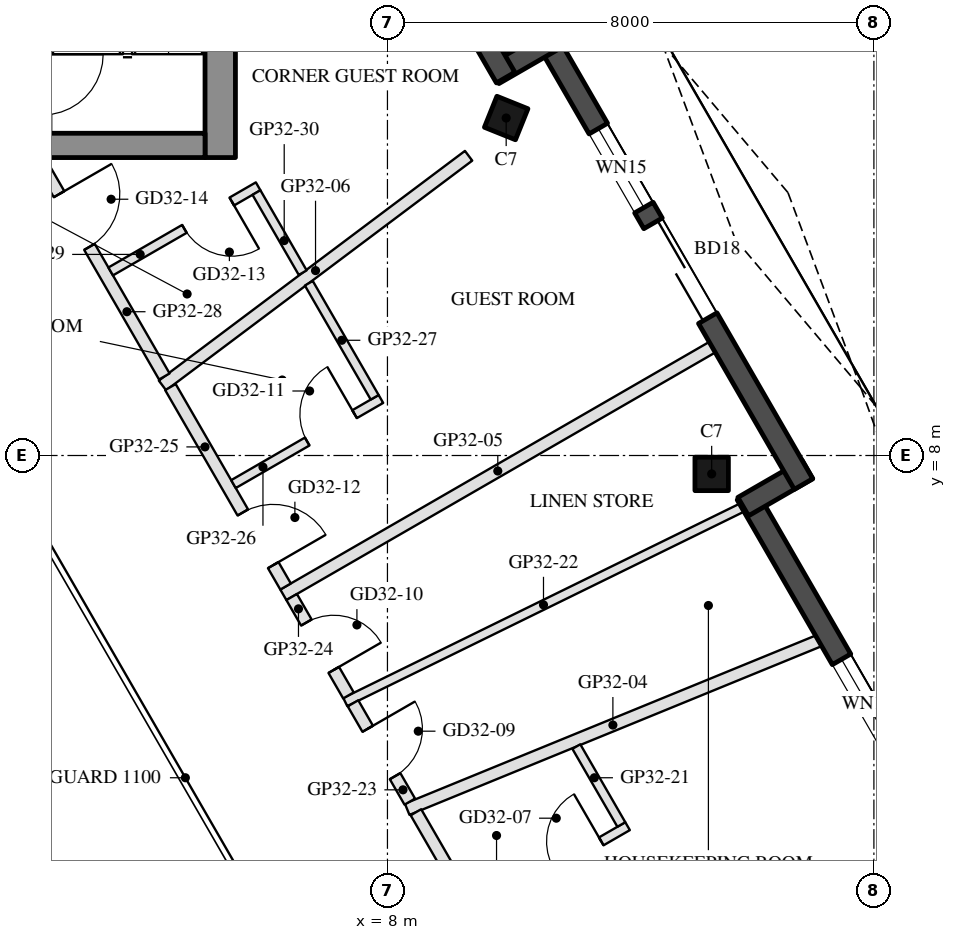
"""IFC4 building model, lengths in metres.
Left out: names, types, materials, properties, quantities, classifications, styles, units other than length and angle.
Written with IfcOpenShell. Run it as: python <this file> out.ifc"""

import sys

from ifc_helpers import new_model, si_unit, direction, frame, frame_2d, origin, origin_2d, place, context, subcontext, project, spatial, rectangle, hollow_rectangle, extrude, boolean, halfspace, element, fill, save


model = new_model("IFC4")
c1 = context("Model", 3, precision=1e-05, world=origin(), true_north=direction((0.0, 1.0)))
c2 = subcontext(c1, "Body", "Model", "MODEL_VIEW")
j1 = project(units=[si_unit("LENGTHUNIT", "METRE"), si_unit("PLANEANGLEUNIT", "RADIAN")], contexts=[c1])
p1 = place(None, origin())
s1 = spatial("IfcSite", under=j1, at=p1, CompositionType="ELEMENT")
p2 = place(p1, origin())
s2 = spatial("IfcBuilding", under=s1, at=p2, CompositionType="ELEMENT")
p3 = place(p2, frame((0.0, 0.0, 309.6)))
s3 = spatial("IfcBuildingStorey", under=s2, at=p3, CompositionType="ELEMENT", Elevation=309.6)
p4 = place(p3, frame((16.711, 1.844, 0.0), z_axis=(-0.161388519526, -0.022915997932, 0.986624854139), x_axis=(0.495109873729, -0.866696335889, 0.060857820306)))
e1 = element("IfcColumn", 1, at=p4, inside=s3, PredefinedType="COLUMN", context=c2, shape_type="SweptSolid", body=[
    boolean("DIFFERENCE", boolean("DIFFERENCE", extrude(hollow_rectangle(XDim=0.55, YDim=0.55, WallThickness=0.025, at=origin_2d()), origin(), (0.0, 0.0, 1.0), 3.75), halfspace(frame((0.0, 0.0, 0.034), z_axis=(0.0, 0.0, 1.0), x_axis=(1.0, 0.0, 0.0)), True)), halfspace(frame((0.0, 0.0, 3.716), z_axis=(0.0, 0.0, 1.0), x_axis=(1.0, 0.0, 0.0)), False)),
])
p5 = place(p3, frame((13.332, 7.697, 0.0), z_axis=(-0.131164739211, -0.075724645561, 0.988464257949), x_axis=(-0.499893753664, 0.866086736301, 1.5860259e-05)))
e2 = element("IfcColumn", 2, at=p5, inside=s3, PredefinedType="COLUMN", context=c2, shape_type="SweptSolid", body=[
    boolean("DIFFERENCE", boolean("DIFFERENCE", extrude(hollow_rectangle(XDim=0.55, YDim=0.55, WallThickness=0.025, at=origin_2d()), origin(), (0.0, 0.0, 1.0), 3.743), halfspace(frame((0.0, 0.0, 0.031), z_axis=(0.0, 0.0, 1.0), x_axis=(1.0, 0.0, 0.0)), True)), halfspace(frame((0.0, 0.0, 3.711), z_axis=(0.0, 0.0, 1.0), x_axis=(1.0, 0.0, 0.0)), False)),
])
p6 = place(p3, frame((9.953, 13.551, 0.0), z_axis=(-0.100518860507, -0.128252691192, 0.98663428173), x_axis=(-0.503004973265, 0.862140661686, 0.060823320673)))
e3 = element("IfcColumn", 3, at=p6, inside=s3, PredefinedType="COLUMN", context=c2, shape_type="SweptSolid", body=[
    boolean("DIFFERENCE", boolean("DIFFERENCE", extrude(hollow_rectangle(XDim=0.55, YDim=0.55, WallThickness=0.025, at=origin_2d()), origin(), (0.0, 0.0, 1.0), 3.75), halfspace(frame((0.0, 0.0, 0.034), z_axis=(0.0, 0.0, 1.0), x_axis=(1.0, 0.0, 0.0)), True)), halfspace(frame((0.0, 0.0, 3.716), z_axis=(0.0, 0.0, 1.0), x_axis=(1.0, 0.0, 0.0)), False)),
])
p7 = place(p3, frame((16.703, 2.509, 0.0), z_axis=(0.0, 0.0, 1.0), x_axis=(-0.499975351079, 0.866039634378, 0.0)))
e4 = element("IfcWall", 4, at=p7, inside=s3, PredefinedType="SOLIDWALL", context=c2, shape_type="SweptSolid", body=[
    extrude(rectangle(XDim=5.599, YDim=0.35, at=frame_2d((2.799, 0.0))), origin(), (0.0, 0.0, 1.0), 3.55),
])
p8 = place(p7, frame((0.77, 0.0, 0.3)))
e5 = element("IfcOpeningElement", 5, at=p8, cuts=e4, PredefinedType="OPENING", context=c2, shape_type="SweptSolid", body=[
    extrude(rectangle(XDim=1.7, YDim=2.65, at=frame_2d((0.85, 1.325))), frame((0.0, 0.185, 0.0), z_axis=(0.0, -1.0, 0.0), x_axis=(1.0, 0.0, 0.0)), (0.0, 0.0, 1.0), 0.37),
])
p9 = place(p3, frame((13.85, 7.159, 0.0), z_axis=(0.0, 0.0, 1.0), x_axis=(0.866005645448, 0.500034220881, 0.0)))
e6 = element("IfcWall", 6, at=p9, inside=s3, PredefinedType="SOLIDWALL", context=c2, shape_type="SweptSolid", body=[
    extrude(rectangle(XDim=1.22, YDim=0.35, at=frame_2d((0.61, 0.0))), origin(), (0.0, 0.0, 1.0), 3.55),
])
p10 = place(p3, frame((14.843, 7.531, 0.0), z_axis=(0.0, 0.0, 1.0), x_axis=(-0.500013816581, 0.866017426631, 0.0)))
e7 = element("IfcWall", 7, at=p10, inside=s3, PredefinedType="SOLIDWALL", context=c2, shape_type="SweptSolid", body=[
    extrude(rectangle(XDim=8.559, YDim=0.35, at=frame_2d((4.279, 0.0))), origin(), (0.0, 0.0, 1.0), 3.55),
])
p11 = place(p10, frame((3.15, 0.0, 0.0)))
e8 = element("IfcOpeningElement", 8, at=p11, cuts=e7, PredefinedType="OPENING", context=c2, shape_type="SweptSolid", body=[
    extrude(rectangle(XDim=1.8, YDim=2.4, at=frame_2d((0.9, 1.2))), frame((0.0, 0.185, 0.0), z_axis=(0.0, -1.0, 0.0), x_axis=(1.0, 0.0, 0.0)), (0.0, 0.0, 1.0), 0.37),
])
p12 = place(p10, frame((5.25, 0.0, 0.3)))
e9 = element("IfcOpeningElement", 9, at=p12, cuts=e7, PredefinedType="OPENING", context=c2, shape_type="SweptSolid", body=[
    extrude(rectangle(XDim=1.5, YDim=2.65, at=frame_2d((0.75, 1.325))), frame((0.0, 0.185, 0.0), z_axis=(0.0, -1.0, 0.0), x_axis=(1.0, 0.0, 0.0)), (0.0, 0.0, 1.0), 0.37),
])
p13 = place(p3, frame((10.802, 14.879, 0.0), z_axis=(0.0, 0.0, 1.0), x_axis=(-0.866005645448, -0.500034220881, 0.0)))
e10 = element("IfcWall", 10, at=p13, inside=s3, PredefinedType="SOLIDWALL", context=c2, shape_type="SweptSolid", body=[
    extrude(rectangle(XDim=1.22, YDim=0.35, at=frame_2d((0.61, 0.0))), origin(), (0.0, 0.0, 1.0), 3.55),
])
p14 = place(p3, frame((9.944, 14.216, 0.0), z_axis=(0.0, 0.0, 1.0), x_axis=(-0.500026936782, 0.866009851268, 0.0)))
e11 = element("IfcWall", 11, at=p14, inside=s3, PredefinedType="SOLIDWALL", context=c2, shape_type="SweptSolid", body=[
    extrude(rectangle(XDim=5.599, YDim=0.35, at=frame_2d((2.799, 0.0))), origin(), (0.0, 0.0, 1.0), 3.55),
])
p15 = place(p14, frame((2.879, 0.0, 0.0)))
e12 = element("IfcOpeningElement", 12, at=p15, cuts=e11, PredefinedType="OPENING", context=c2, shape_type="SweptSolid", body=[
    extrude(rectangle(XDim=2.4, YDim=2.4, at=frame_2d((1.2, 1.2))), frame((0.0, 0.185, 0.0), z_axis=(0.0, -1.0, 0.0), x_axis=(1.0, 0.0, 0.0)), (0.0, 0.0, 1.0), 0.37),
])
p16 = place(p14, frame((0.77, 0.0, 0.3)))
e13 = element("IfcOpeningElement", 13, at=p16, cuts=e11, PredefinedType="OPENING", context=c2, shape_type="SweptSolid", body=[
    extrude(rectangle(XDim=1.8, YDim=2.65, at=frame_2d((0.9, 1.325))), frame((0.0, 0.185, 0.0), z_axis=(0.0, -1.0, 0.0), x_axis=(1.0, 0.0, 0.0)), (0.0, 0.0, 1.0), 0.37),
])
p17 = place(p3, frame((5.25, 12.9, 0.0), z_axis=(0.0, 0.0, 1.0), x_axis=(0.0, 1.0, 0.0)))
e14 = element("IfcWall", 14, at=p17, inside=s3, PredefinedType="SHEAR", context=c2, shape_type="SweptSolid", body=[
    extrude(rectangle(XDim=10.299, YDim=0.5, at=frame_2d((5.149, 0.0))), origin(), (0.0, 0.0, 1.0), 3.5),
])
p18 = place(p3, frame((5.0, 13.1, 0.0), z_axis=(0.0, 0.0, 1.0), x_axis=(-1.0, 0.0, 0.0)))
e15 = element("IfcWall", 15, at=p18, inside=s3, PredefinedType="SHEAR", context=c2, shape_type="SweptSolid", body=[
    extrude(rectangle(XDim=10.0, YDim=0.4, at=frame_2d((5.0, 0.0))), origin(), (0.0, 0.0, 1.0), 3.5),
])
p19 = place(p18, frame((3.55, 0.0, 0.0)))
e16 = element("IfcOpeningElement", 16, at=p19, cuts=e15, PredefinedType="OPENING", context=c2, shape_type="SweptSolid", body=[
    extrude(rectangle(XDim=1.1, YDim=2.1, at=frame_2d((0.55, 1.05))), frame((0.0, 0.21, 0.0), z_axis=(0.0, -1.0, 0.0), x_axis=(1.0, 0.0, 0.0)), (0.0, 0.0, 1.0), 0.42),
])
p20 = place(p18, frame((5.85, 0.0, 0.0)))
e17 = element("IfcOpeningElement", 17, at=p20, cuts=e15, PredefinedType="OPENING", context=c2, shape_type="SweptSolid", body=[
    extrude(rectangle(XDim=1.4, YDim=2.1, at=frame_2d((0.7, 1.05))), frame((0.0, 0.21, 0.0), z_axis=(0.0, -1.0, 0.0), x_axis=(1.0, 0.0, 0.0)), (0.0, 0.0, 1.0), 0.42),
])
p21 = place(p3, frame((15.091, 4.951, 0.0), z_axis=(0.0, 0.0, 1.0), x_axis=(-0.925459695547, -0.378846079454, 0.0)))
e18 = element("IfcWall", 18, at=p21, inside=s3, PredefinedType="PARTITIONING", context=c2, shape_type="SweptSolid", body=[
    extrude(rectangle(XDim=7.311, YDim=0.2, at=frame_2d((3.656, 0.0))), origin(), (0.0, 0.0, 1.0), 3.1),
])
p22 = place(p3, frame((13.341, 9.781, 0.0), z_axis=(0.0, 0.0, 1.0), x_axis=(-0.866020851292, -0.500007885066, 0.0)))
e19 = element("IfcWall", 19, at=p22, inside=s3, PredefinedType="PARTITIONING", context=c2, shape_type="SweptSolid", body=[
    extrude(rectangle(XDim=8.144, YDim=0.2, at=frame_2d((4.072, 0.0))), origin(), (0.0, 0.0, 1.0), 3.1),
])
p23 = place(p3, frame((9.334, 12.93, 0.0), z_axis=(0.0, 0.0, 1.0), x_axis=(-0.799864994536, -0.600179965107, 0.0)))
e20 = element("IfcWall", 20, at=p23, inside=s3, PredefinedType="PARTITIONING", context=c2, shape_type="SweptSolid", body=[
    extrude(rectangle(XDim=6.294, YDim=0.2, at=frame_2d((3.147, 0.0))), origin(), (0.0, 0.0, 1.0), 3.1),
])
p24 = place(p3, frame((8.468, 2.133, 0.0), z_axis=(0.0, 0.0, 1.0), x_axis=(0.50001161234, -0.866018699293, 0.0)))
e21 = element("IfcWall", 21, at=p24, inside=s3, PredefinedType="PARTITIONING", context=c2, shape_type="SweptSolid", body=[
    extrude(rectangle(XDim=7.601, YDim=0.2, at=frame_2d((3.8, 0.0))), origin(), (0.0, 0.0, 1.0), 3.1),
])
p25 = place(p24, frame((2.464, 0.0, 0.0)))
e22 = element("IfcOpeningElement", 22, at=p25, cuts=e21, PredefinedType="OPENING", context=c2, shape_type="SweptSolid", body=[
    extrude(rectangle(XDim=1.0, YDim=2.1, at=frame_2d((0.5, 1.05))), frame((0.0, 0.11, 0.0), z_axis=(0.0, -1.0, 0.0), x_axis=(1.0, 0.0, 0.0)), (0.0, 0.0, 1.0), 0.22),
])
p26 = place(p3, frame((9.524, 0.504, 0.0), z_axis=(0.0, 0.0, 1.0), x_axis=(0.866034573852, 0.49998411664, 0.0)))
e23 = element("IfcWall", 23, at=p26, inside=s3, PredefinedType="PARTITIONING", context=c2, shape_type="SweptSolid", body=[
    extrude(rectangle(XDim=2.8, YDim=0.15, at=frame_2d((1.4, 0.0))), origin(), (0.0, 0.0, 1.0), 3.55),
])
p27 = place(p26, frame((1.4, 0.0, 0.0)))
e24 = element("IfcOpeningElement", 24, at=p27, cuts=e23, PredefinedType="OPENING", context=c2, shape_type="SweptSolid", body=[
    extrude(rectangle(XDim=0.9, YDim=2.1, at=frame_2d((0.45, 1.05))), frame((0.0, 0.085, 0.0), z_axis=(0.0, -1.0, 0.0), x_axis=(1.0, 0.0, 0.0)), (0.0, 0.0, 1.0), 0.17),
])
p28 = place(p3, frame((11.847, 1.931, 0.0), z_axis=(0.0, 0.0, 1.0), x_axis=(-0.50006043627, 0.865990508076, 0.0)))
e25 = element("IfcWall", 25, at=p28, inside=s3, PredefinedType="PARTITIONING", context=c2, shape_type="SweptSolid", body=[
    extrude(rectangle(XDim=1.48, YDim=0.15, at=frame_2d((0.74, 0.0))), origin(), (0.0, 0.0, 1.0), 3.1),
])
p29 = place(p3, frame((13.826, 7.141, 0.0), z_axis=(0.0, 0.0, 1.0), x_axis=(-0.897929581281, -0.440139145113, 0.0)))
e26 = element("IfcWall", 26, at=p29, inside=s3, PredefinedType="PARTITIONING", context=c2, shape_type="SweptSolid", body=[
    extrude(rectangle(XDim=7.261, YDim=0.15, at=frame_2d((3.631, 0.0))), origin(), (0.0, 0.0, 1.0), 3.1),
])
p30 = place(p3, frame((7.434, 3.924, 0.0), z_axis=(0.0, 0.0, 1.0), x_axis=(0.500118569225, -0.865956936987, 0.0)))
e27 = element("IfcWall", 27, at=p30, inside=s3, PredefinedType="PARTITIONING", context=c2, shape_type="SweptSolid", body=[
    extrude(rectangle(XDim=1.867, YDim=0.2, at=frame_2d((0.934, 0.0))), origin(), (0.0, 0.0, 1.0), 3.55),
])
p31 = place(p30, frame((0.484, 0.0, 0.0)))
e28 = element("IfcOpeningElement", 28, at=p31, cuts=e27, PredefinedType="OPENING", context=c2, shape_type="SweptSolid", body=[
    extrude(rectangle(XDim=0.9, YDim=2.1, at=frame_2d((0.45, 1.05))), frame((0.0, 0.11, 0.0), z_axis=(0.0, -1.0, 0.0), x_axis=(1.0, 0.0, 0.0)), (0.0, 0.0, 1.0), 0.22),
])
p32 = place(p3, frame((6.425, 5.672, 0.0), z_axis=(0.0, 0.0, 1.0), x_axis=(0.499990175874, -0.866031075672, 0.0)))
e29 = element("IfcWall", 29, at=p32, inside=s3, PredefinedType="PARTITIONING", context=c2, shape_type="SweptSolid", body=[
    extrude(rectangle(XDim=1.868, YDim=0.2, at=frame_2d((0.934, 0.0))), origin(), (0.0, 0.0, 1.0), 3.1),
])
p33 = place(p32, frame((0.484, 0.0, 0.0)))
e30 = element("IfcOpeningElement", 30, at=p33, cuts=e29, PredefinedType="OPENING", context=c2, shape_type="SweptSolid", body=[
    extrude(rectangle(XDim=0.9, YDim=2.1, at=frame_2d((0.45, 1.05))), frame((0.0, 0.11, 0.0), z_axis=(0.0, -1.0, 0.0), x_axis=(1.0, 0.0, 0.0)), (0.0, 0.0, 1.0), 0.22),
])
p34 = place(p3, frame((4.431, 9.125, 0.0), z_axis=(0.0, 0.0, 1.0), x_axis=(0.500042375223, -0.866000937056, 0.0)))
e31 = element("IfcWall", 31, at=p34, inside=s3, PredefinedType="PARTITIONING", context=c2, shape_type="SweptSolid", body=[
    extrude(rectangle(XDim=3.787, YDim=0.2, at=frame_2d((1.894, 0.0))), origin(), (0.0, 0.0, 1.0), 3.1),
])
p35 = place(p34, frame((2.381, 0.0, 0.0)))
e32 = element("IfcOpeningElement", 32, at=p35, cuts=e31, PredefinedType="OPENING", context=c2, shape_type="SweptSolid", body=[
    extrude(rectangle(XDim=1.0, YDim=2.1, at=frame_2d((0.5, 1.05))), frame((0.0, 0.11, 0.0), z_axis=(0.0, -1.0, 0.0), x_axis=(1.0, 0.0, 0.0)), (0.0, 0.0, 1.0), 0.22),
])
p36 = place(p3, frame((5.468, 7.53, 0.0), z_axis=(0.0, 0.0, 1.0), x_axis=(0.866034573852, 0.49998411664, 0.0)))
e33 = element("IfcWall", 33, at=p36, inside=s3, PredefinedType="PARTITIONING", context=c2, shape_type="SweptSolid", body=[
    extrude(rectangle(XDim=2.8, YDim=0.15, at=frame_2d((1.4, 0.0))), origin(), (0.0, 0.0, 1.0), 3.55),
])
p37 = place(p36, frame((1.4, 0.0, 0.0)))
e34 = element("IfcOpeningElement", 34, at=p37, cuts=e33, PredefinedType="OPENING", context=c2, shape_type="SweptSolid", body=[
    extrude(rectangle(XDim=0.9, YDim=2.1, at=frame_2d((0.45, 1.05))), frame((0.0, 0.085, 0.0), z_axis=(0.0, -1.0, 0.0), x_axis=(1.0, 0.0, 0.0)), (0.0, 0.0, 1.0), 0.17),
])
p38 = place(p3, frame((7.79, 8.957, 0.0), z_axis=(0.0, 0.0, 1.0), x_axis=(-0.500018419339, 0.866014769113, 0.0)))
e35 = element("IfcWall", 35, at=p38, inside=s3, PredefinedType="PARTITIONING", context=c2, shape_type="SweptSolid", body=[
    extrude(rectangle(XDim=2.166, YDim=0.15, at=frame_2d((1.083, 0.0))), origin(), (0.0, 0.0, 1.0), 3.55),
])
p39 = place(p3, frame((2.281, 12.85, 0.0), z_axis=(0.0, 0.0, 1.0), x_axis=(0.500007699544, -0.866020958405, 0.0)))
e36 = element("IfcWall", 36, at=p39, inside=s3, PredefinedType="PARTITIONING", context=c2, shape_type="SweptSolid", body=[
    extrude(rectangle(XDim=4.1, YDim=0.2, at=frame_2d((2.05, 0.0))), origin(), (0.0, 0.0, 1.0), 3.1),
])
p40 = place(p39, frame((0.637, 0.0, 0.0)))
e37 = element("IfcOpeningElement", 37, at=p40, cuts=e36, PredefinedType="OPENING", context=c2, shape_type="SweptSolid", body=[
    extrude(rectangle(XDim=1.0, YDim=2.1, at=frame_2d((0.5, 1.05))), frame((0.0, 0.11, 0.0), z_axis=(0.0, -1.0, 0.0), x_axis=(1.0, 0.0, 0.0)), (0.0, 0.0, 1.0), 0.22),
])
p41 = place(p3, frame((5.873, 12.427, 0.0), z_axis=(0.0, 0.0, 1.0), x_axis=(-0.866034573852, -0.49998411664, 0.0)))
e38 = element("IfcWall", 38, at=p41, inside=s3, PredefinedType="PARTITIONING", context=c2, shape_type="SweptSolid", body=[
    extrude(rectangle(XDim=2.8, YDim=0.15, at=frame_2d((1.4, 0.0))), origin(), (0.0, 0.0, 1.0), 3.55),
])
p42 = place(p41, frame((0.5, 0.0, 0.0)))
e39 = element("IfcOpeningElement", 39, at=p42, cuts=e38, PredefinedType="OPENING", context=c2, shape_type="SweptSolid", body=[
    extrude(rectangle(XDim=0.9, YDim=2.1, at=frame_2d((0.45, 1.05))), frame((0.0, 0.085, 0.0), z_axis=(0.0, -1.0, 0.0), x_axis=(1.0, 0.0, 0.0)), (0.0, 0.0, 1.0), 0.17),
])
p43 = place(p3, frame((6.606, 11.008, 0.0), z_axis=(0.0, 0.0, 1.0), x_axis=(-0.500023511883, 0.866011828767, 0.0)))
e40 = element("IfcWall", 40, at=p43, inside=s3, PredefinedType="PARTITIONING", context=c2, shape_type="SweptSolid", body=[
    extrude(rectangle(XDim=1.521, YDim=0.15, at=frame_2d((0.76, 0.0))), origin(), (0.0, 0.0, 1.0), 3.1),
])
p44 = place(p8, origin())
e41 = element("IfcWindow", 41, at=p44, inside=s3, PartitioningType="SINGLE_PANEL", PredefinedType="WINDOW", context=c2, shape_type="SweptSolid", body=[
    extrude(rectangle(XDim=1.7, YDim=2.65, at=frame_2d((0.85, 1.325))), frame((0.0, 0.03, 0.0), z_axis=(0.0, -1.0, 0.0), x_axis=(1.0, 0.0, 0.0)), (0.0, 0.0, 1.0), 0.06),
])
fill(e5, e41)
p45 = place(p11, frame((1.8, 0.0, 0.0), z_axis=(0.0, 0.0, 1.0), x_axis=(-1.0, 0.0, 0.0)))
e42 = element("IfcDoor", 42, at=p45, inside=s3, OperationType="SLIDING_TO_LEFT", PredefinedType="DOOR", context=c2, shape_type="SweptSolid", body=[
    extrude(rectangle(XDim=1.8, YDim=2.4, at=frame_2d((0.9, 1.2))), frame((0.0, 0.025, 0.0), z_axis=(0.0, -1.0, 0.0), x_axis=(1.0, 0.0, 0.0)), (0.0, 0.0, 1.0), 0.05),
])
fill(e8, e42)
p46 = place(p12, origin())
e43 = element("IfcWindow", 43, at=p46, inside=s3, PartitioningType="SINGLE_PANEL", PredefinedType="WINDOW", context=c2, shape_type="SweptSolid", body=[
    extrude(rectangle(XDim=1.5, YDim=2.65, at=frame_2d((0.75, 1.325))), frame((0.0, 0.03, 0.0), z_axis=(0.0, -1.0, 0.0), x_axis=(1.0, 0.0, 0.0)), (0.0, 0.0, 1.0), 0.06),
])
fill(e9, e43)
p47 = place(p27, origin())
e44 = element("IfcDoor", 44, at=p47, inside=s3, OperationType="SINGLE_SWING_RIGHT", PredefinedType="DOOR", context=c2, shape_type="SweptSolid", body=[
    extrude(rectangle(XDim=0.9, YDim=2.1, at=frame_2d((0.45, 1.05))), frame((0.0, 0.025, 0.0), z_axis=(0.0, -1.0, 0.0), x_axis=(1.0, 0.0, 0.0)), (0.0, 0.0, 1.0), 0.05),
])
fill(e24, e44)
p48 = place(p31, origin())
e45 = element("IfcDoor", 45, at=p48, inside=s3, OperationType="SINGLE_SWING_LEFT", PredefinedType="DOOR", context=c2, shape_type="SweptSolid", body=[
    extrude(rectangle(XDim=0.9, YDim=2.1, at=frame_2d((0.45, 1.05))), frame((0.0, 0.025, 0.0), z_axis=(0.0, -1.0, 0.0), x_axis=(1.0, 0.0, 0.0)), (0.0, 0.0, 1.0), 0.05),
])
fill(e28, e45)
p49 = place(p33, origin())
e46 = element("IfcDoor", 46, at=p49, inside=s3, OperationType="SINGLE_SWING_RIGHT", PredefinedType="DOOR", context=c2, shape_type="SweptSolid", body=[
    extrude(rectangle(XDim=0.9, YDim=2.1, at=frame_2d((0.45, 1.05))), frame((0.0, 0.025, 0.0), z_axis=(0.0, -1.0, 0.0), x_axis=(1.0, 0.0, 0.0)), (0.0, 0.0, 1.0), 0.05),
])
fill(e30, e46)
p50 = place(p37, origin())
e47 = element("IfcDoor", 47, at=p50, inside=s3, OperationType="SINGLE_SWING_RIGHT", PredefinedType="DOOR", context=c2, shape_type="SweptSolid", body=[
    extrude(rectangle(XDim=0.9, YDim=2.1, at=frame_2d((0.45, 1.05))), frame((0.0, 0.025, 0.0), z_axis=(0.0, -1.0, 0.0), x_axis=(1.0, 0.0, 0.0)), (0.0, 0.0, 1.0), 0.05),
])
fill(e34, e47)
p51 = place(p35, origin())
e48 = element("IfcDoor", 48, at=p51, inside=s3, OperationType="SINGLE_SWING_RIGHT", PredefinedType="DOOR", context=c2, shape_type="SweptSolid", body=[
    extrude(rectangle(XDim=1.0, YDim=2.1, at=frame_2d((0.5, 1.05))), frame((0.0, 0.025, 0.0), z_axis=(0.0, -1.0, 0.0), x_axis=(1.0, 0.0, 0.0)), (0.0, 0.0, 1.0), 0.05),
])
fill(e32, e48)
p52 = place(p42, origin())
e49 = element("IfcDoor", 49, at=p52, inside=s3, OperationType="SINGLE_SWING_LEFT", PredefinedType="DOOR", context=c2, shape_type="SweptSolid", body=[
    extrude(rectangle(XDim=0.9, YDim=2.1, at=frame_2d((0.45, 1.05))), frame((0.0, 0.025, 0.0), z_axis=(0.0, -1.0, 0.0), x_axis=(1.0, 0.0, 0.0)), (0.0, 0.0, 1.0), 0.05),
])
fill(e39, e49)
p53 = place(p40, origin())
e50 = element("IfcDoor", 50, at=p53, inside=s3, OperationType="SINGLE_SWING_LEFT", PredefinedType="DOOR", context=c2, shape_type="SweptSolid", body=[
    extrude(rectangle(XDim=1.0, YDim=2.1, at=frame_2d((0.5, 1.05))), frame((0.0, 0.025, 0.0), z_axis=(0.0, -1.0, 0.0), x_axis=(1.0, 0.0, 0.0)), (0.0, 0.0, 1.0), 0.05),
])
fill(e37, e50)
save(model, sys.argv[1])
